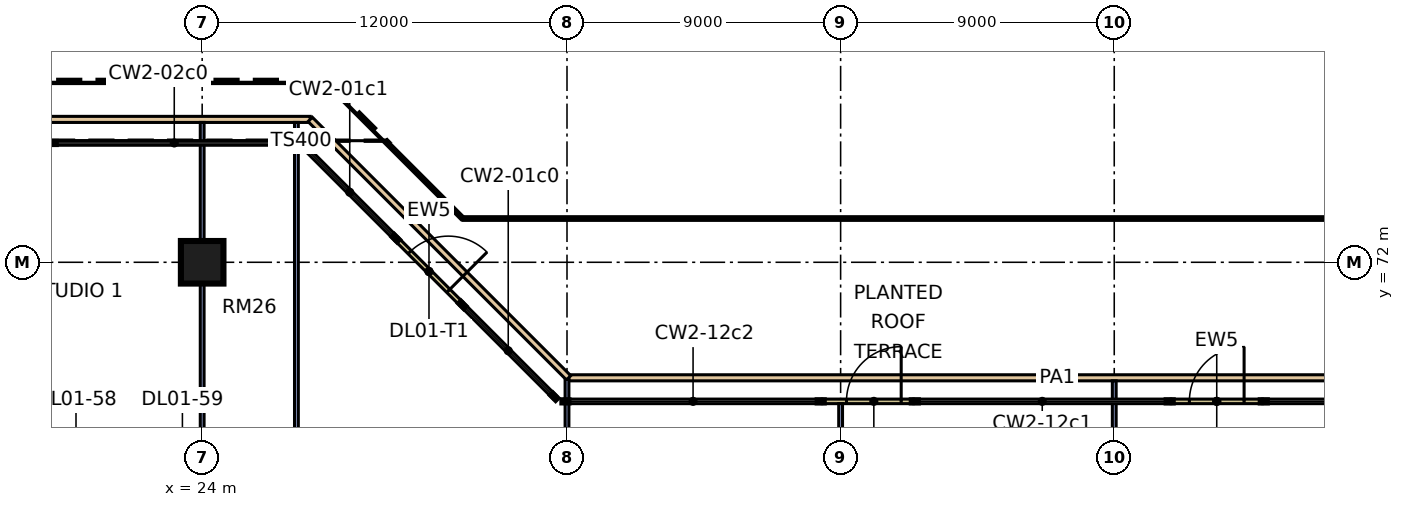
"""IFC4 building model, lengths in metres.
Left out: names, types, materials, properties, quantities, classifications, styles, units other than length and angle.
Written with IfcOpenShell. Run it as: python <this file> out.ifc"""

import sys

from ifc_helpers import new_model, si_unit, direction, frame, frame_2d, origin, origin_2d, place, context, subcontext, project, spatial, rectangle, extrude, element, fill, save


model = new_model("IFC4")
c1 = context("Model", 3, precision=1e-05, world=origin(), true_north=direction((0.0, 1.0)))
c2 = subcontext(c1, "Body", "Model", "MODEL_VIEW")
j1 = project(units=[si_unit("LENGTHUNIT", "METRE"), si_unit("PLANEANGLEUNIT", "RADIAN")], contexts=[c1])
p1 = place(None, origin())
s1 = spatial("IfcSite", under=j1, at=p1, CompositionType="ELEMENT")
p2 = place(p1, origin())
s2 = spatial("IfcBuilding", under=s1, at=p2, CompositionType="ELEMENT")
p3 = place(p2, frame((0.0, 0.0, 7.2)))
s3 = spatial("IfcBuildingStorey", under=s2, at=p3, CompositionType="ELEMENT", Elevation=7.2)
p4 = place(p3, frame((24.0, 72.0, 0.0), z_axis=(0.0, 0.0, 1.0), x_axis=(1.0, 0.0, 0.0)))
e1 = element("IfcColumn", 1, at=p4, inside=s3, PredefinedType="COLUMN", context=c2, shape_type="SweptSolid", body=[
    extrude(rectangle(XDim=1.4, YDim=1.4, at=origin_2d()), origin(), (0.0, 0.0, 1.0), 4.8),
])
p5 = place(p3, frame((32.521, 70.636, 0.0), z_axis=(0.0, 0.0, 1.0), x_axis=(-0.707106781187, 0.707106781187, 0.0)))
e2 = element("IfcWall", 2, at=p5, inside=s3, PredefinedType="SOLIDWALL", context=c2, shape_type="SweptSolid", body=[
    extrude(rectangle(XDim=3.0, YDim=0.15, at=frame_2d((1.5, 0.0))), origin(), (0.0, 0.0, 1.0), 4.4),
])
p6 = place(p5, frame((0.6, 0.0, 0.0)))
e3 = element("IfcOpeningElement", 3, at=p6, cuts=e2, PredefinedType="OPENING", context=c2, shape_type="SweptSolid", body=[
    extrude(rectangle(XDim=1.8, YDim=2.4, at=frame_2d((0.9, 1.2))), frame((0.0, 0.085, 0.0), z_axis=(0.0, -1.0, 0.0), x_axis=(1.0, 0.0, 0.0)), (0.0, 0.0, 1.0), 0.17),
])
p7 = place(p3, frame((58.871, 67.425, 0.0), z_axis=(0.0, 0.0, 1.0), x_axis=(-1.0, 0.0, 0.0)))
e4 = element("IfcWall", 4, at=p7, inside=s3, PredefinedType="SOLIDWALL", context=c2, shape_type="SweptSolid", body=[
    extrude(rectangle(XDim=3.0, YDim=0.15, at=frame_2d((1.5, 0.0))), origin(), (0.0, 0.0, 1.0), 4.4),
])
p8 = place(p7, frame((0.6, 0.0, 0.0)))
e5 = element("IfcOpeningElement", 5, at=p8, cuts=e4, PredefinedType="OPENING", context=c2, shape_type="SweptSolid", body=[
    extrude(rectangle(XDim=1.8, YDim=2.4, at=frame_2d((0.9, 1.2))), frame((0.0, 0.085, 0.0), z_axis=(0.0, -1.0, 0.0), x_axis=(1.0, 0.0, 0.0)), (0.0, 0.0, 1.0), 0.17),
])
p9 = place(p3, frame((47.392, 67.425, 0.0), z_axis=(0.0, 0.0, 1.0), x_axis=(-1.0, 0.0, 0.0)))
e6 = element("IfcWall", 6, at=p9, inside=s3, PredefinedType="SOLIDWALL", context=c2, shape_type="SweptSolid", body=[
    extrude(rectangle(XDim=3.0, YDim=0.15, at=frame_2d((1.5, 0.0))), origin(), (0.0, 0.0, 1.0), 4.4),
])
p10 = place(p9, frame((0.4, 0.0, 0.0)))
e7 = element("IfcOpeningElement", 7, at=p10, cuts=e6, PredefinedType="OPENING", context=c2, shape_type="SweptSolid", body=[
    extrude(rectangle(XDim=1.8, YDim=2.4, at=frame_2d((0.9, 1.2))), frame((0.0, 0.085, 0.0), z_axis=(0.0, -1.0, 0.0), x_axis=(1.0, 0.0, 0.0)), (0.0, 0.0, 1.0), 0.17),
])
p11 = place(p3, frame((36.053, 68.2, 0.0), z_axis=(0.0, 0.0, 1.0), x_axis=(1.0, 0.0, 0.0)))
e8 = element("IfcWall", 8, at=p11, inside=s3, PredefinedType="PARAPET", context=c2, shape_type="SweptSolid", body=[
    extrude(rectangle(XDim=32.146, YDim=0.2, at=frame_2d((16.073, 0.0))), origin(), (0.0, 0.0, 1.0), 0.5),
])
p12 = place(p3, frame((-3.553, 76.7, 0.0), z_axis=(0.0, 0.0, 1.0), x_axis=(1.0, 0.0, 0.0)))
e9 = element("IfcWall", 9, at=p12, inside=s3, PredefinedType="PARAPET", context=c2, shape_type="SweptSolid", body=[
    extrude(rectangle(XDim=31.107, YDim=0.2, at=frame_2d((15.553, 0.0))), origin(), (0.0, 0.0, 1.0), 0.5),
])
p13 = place(p3, frame((27.553, 76.7, 0.0), z_axis=(0.0, 0.0, 1.0), x_axis=(0.707106781187, -0.707106781187, 0.0)))
e10 = element("IfcWall", 10, at=p13, inside=s3, PredefinedType="PARAPET", context=c2, shape_type="SweptSolid", body=[
    extrude(rectangle(XDim=12.021, YDim=0.2, at=frame_2d((6.01, 0.0))), origin(), (0.0, 0.0, 1.0), 0.5),
])
p14 = place(p3, frame((24.0, 66.2, 0.0), z_axis=(0.0, 0.0, 1.0), x_axis=(0.0, 1.0, 0.0)))
e11 = element("IfcWall", 11, at=p14, inside=s3, PredefinedType="PARTITIONING", context=c2, shape_type="SweptSolid", body=[
    extrude(rectangle(XDim=10.4, YDim=0.125, at=frame_2d((5.2, 0.0))), origin(), (0.0, 0.0, 1.0), 4.4),
])
p15 = place(p3, frame((27.1, 66.1, 0.0), z_axis=(0.0, 0.0, 1.0), x_axis=(0.0, 1.0, 0.0)))
e12 = element("IfcWall", 12, at=p15, inside=s3, PredefinedType="PARTITIONING", context=c2, shape_type="SweptSolid", body=[
    extrude(rectangle(XDim=10.5, YDim=0.125, at=frame_2d((5.25, 0.0))), origin(), (0.0, 0.0, 1.0), 4.4),
])
p16 = place(p3, frame((36.0, 41.4, 0.0), z_axis=(0.0, 0.0, 1.0), x_axis=(0.0, 1.0, 0.0)))
e13 = element("IfcWall", 13, at=p16, inside=s3, PredefinedType="PARTITIONING", context=c2, shape_type="SweptSolid", body=[
    extrude(rectangle(XDim=26.747, YDim=0.125, at=frame_2d((13.373, 0.0))), origin(), (0.0, 0.0, 1.0), 4.4),
])
p17 = place(p3, frame((45.0, 41.5, 0.0), z_axis=(0.0, 0.0, 1.0), x_axis=(0.0, 1.0, 0.0)))
e14 = element("IfcWall", 14, at=p17, inside=s3, PredefinedType="PARTITIONING", context=c2, shape_type="SweptSolid", body=[
    extrude(rectangle(XDim=25.851, YDim=0.125, at=frame_2d((12.926, 0.0))), origin(), (0.0, 0.0, 1.0), 4.4),
])
p18 = place(p3, frame((54.0, 41.5, 0.0), z_axis=(0.0, 0.0, 1.0), x_axis=(0.0, 1.0, 0.0)))
e15 = element("IfcWall", 15, at=p18, inside=s3, PredefinedType="PARTITIONING", context=c2, shape_type="SweptSolid", body=[
    extrude(rectangle(XDim=26.6, YDim=0.125, at=frame_2d((13.3, 0.0))), origin(), (0.0, 0.0, 1.0), 4.4),
])
p19 = place(p6, frame((1.8, 0.0, 0.0), z_axis=(0.0, 0.0, 1.0), x_axis=(-1.0, 0.0, 0.0)))
e16 = element("IfcDoor", 16, at=p19, inside=s3, OperationType="DOUBLE_DOOR_SINGLE_SWING", PredefinedType="DOOR", context=c2, shape_type="SweptSolid", body=[
    extrude(rectangle(XDim=1.8, YDim=2.4, at=frame_2d((0.9, 1.2))), frame((0.0, 0.025, 0.0), z_axis=(0.0, -1.0, 0.0), x_axis=(1.0, 0.0, 0.0)), (0.0, 0.0, 1.0), 0.05),
])
fill(e3, e16)
p20 = place(p8, frame((1.8, 0.0, 0.0), z_axis=(0.0, 0.0, 1.0), x_axis=(-1.0, 0.0, 0.0)))
e17 = element("IfcDoor", 17, at=p20, inside=s3, OperationType="DOUBLE_DOOR_SINGLE_SWING", PredefinedType="DOOR", context=c2, shape_type="SweptSolid", body=[
    extrude(rectangle(XDim=1.8, YDim=2.4, at=frame_2d((0.9, 1.2))), frame((0.0, 0.025, 0.0), z_axis=(0.0, -1.0, 0.0), x_axis=(1.0, 0.0, 0.0)), (0.0, 0.0, 1.0), 0.05),
])
fill(e5, e17)
p21 = place(p10, frame((1.8, 0.0, 0.0), z_axis=(0.0, 0.0, 1.0), x_axis=(-1.0, 0.0, 0.0)))
e18 = element("IfcDoor", 18, at=p21, inside=s3, OperationType="DOUBLE_DOOR_SINGLE_SWING", PredefinedType="DOOR", context=c2, shape_type="SweptSolid", body=[
    extrude(rectangle(XDim=1.8, YDim=2.4, at=frame_2d((0.9, 1.2))), frame((0.0, 0.025, 0.0), z_axis=(0.0, -1.0, 0.0), x_axis=(1.0, 0.0, 0.0)), (0.0, 0.0, 1.0), 0.05),
])
fill(e7, e18)
save(model, sys.argv[1])
